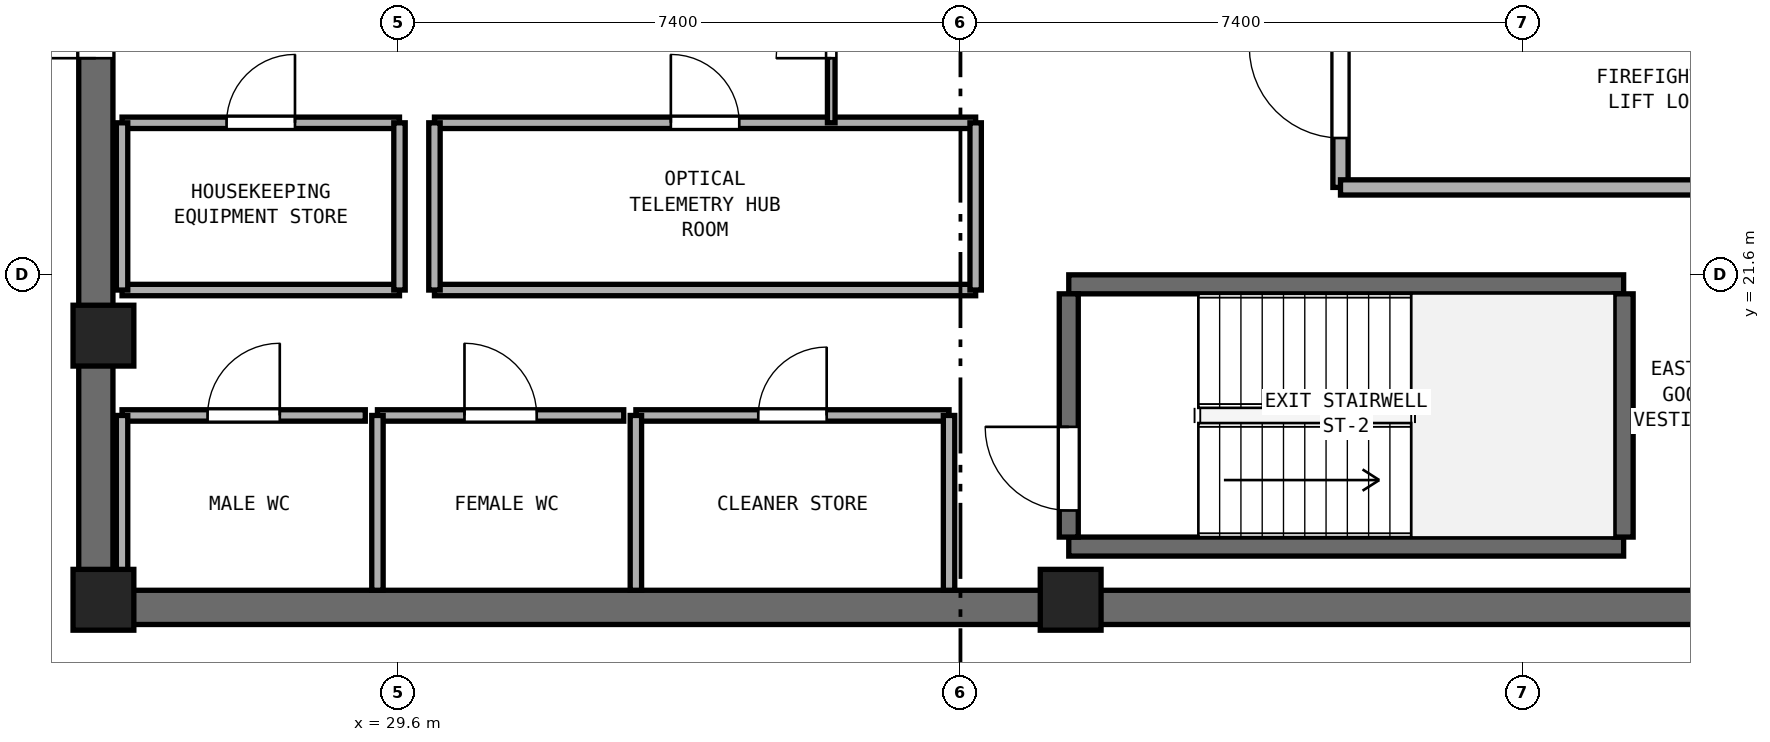
"""IFC4 building model, lengths in metres.
Left out: names, types, materials, properties, quantities, classifications, styles, units other than length and angle.
Written with IfcOpenShell. Run it as: python <this file> out.ifc"""

import sys

from ifc_helpers import new_model, si_unit, direction, frame, frame_2d, origin, origin_2d, place, context, subcontext, project, spatial, rectangle, extrude, element, fill, save


model = new_model("IFC4")
c1 = context("Model", 3, precision=1e-05, world=origin(), true_north=direction((0.0, 1.0)))
c2 = subcontext(c1, "Body", "Model", "MODEL_VIEW")
j1 = project(units=[si_unit("LENGTHUNIT", "METRE"), si_unit("PLANEANGLEUNIT", "RADIAN")], contexts=[c1])
p1 = place(None, origin())
s1 = spatial("IfcSite", under=j1, at=p1, CompositionType="ELEMENT")
p2 = place(p1, origin())
s2 = spatial("IfcBuilding", under=s1, at=p2, CompositionType="ELEMENT")
p3 = place(p2, frame((0.0, 0.0, 255.4)))
s3 = spatial("IfcBuildingStorey", under=s2, at=p3, CompositionType="ELEMENT", Elevation=255.4)
p4 = place(p3, frame((25.4, 17.225, 0.0), z_axis=(0.0, 0.0, 1.0), x_axis=(1.0, 0.0, 0.0)))
e1 = element("IfcWall", 1, at=p4, inside=s3, PredefinedType="SHEAR", context=c2, shape_type="SweptSolid", body=[
    extrude(rectangle(XDim=23.2, YDim=0.45, at=frame_2d((11.6, 0.0))), origin(), (0.0, 0.0, 1.0), 3.51),
])
p5 = place(p3, frame((25.625, 17.45, 0.0), z_axis=(0.0, 0.0, 1.0), x_axis=(0.0, 1.0, 0.0)))
e2 = element("IfcWall", 2, at=p5, inside=s3, PredefinedType="SHEAR", context=c2, shape_type="SweptSolid", body=[
    extrude(rectangle(XDim=15.5, YDim=0.45, at=frame_2d((7.75, 0.0))), origin(), (0.0, 0.0, 1.0), 3.51),
])
p6 = place(p5, frame((7.0, 0.0, 0.0)))
e3 = element("IfcOpeningElement", 3, at=p6, cuts=e2, PredefinedType="OPENING", context=c2, shape_type="SweptSolid", body=[
    extrude(rectangle(XDim=1.5, YDim=2.15, at=frame_2d((0.75, 1.075))), frame((0.0, 0.235, 0.0), z_axis=(0.0, -1.0, 0.0), x_axis=(1.0, 0.0, 0.0)), (0.0, 0.0, 1.0), 0.47),
])
for number, where, z_axis, x_axis in (
    (4, (25.725, 17.325, 0.0), (0.0, 0.0, 1.0), (1.0, 0.0, 0.0)),
    (5, (38.45, 17.325, 0.0), (0.0, 0.0, 1.0), (1.0, 0.0, 0.0)),
    (6, (25.725, 20.8, 0.0), (0.0, 0.0, 1.0), (1.0, 0.0, 0.0)),
):
    element("IfcColumn", number, at=place(p3, frame(where, z_axis=z_axis, x_axis=x_axis)), inside=s3, PredefinedType="PILASTER", context=c2, shape_type="SweptSolid", body=[
        extrude(rectangle(XDim=0.8, YDim=0.8, at=origin_2d()), origin(), (0.0, 0.0, 1.0), 3.8),
    ])
for number, where, z_axis, x_axis in (
    (7, (38.425, 18.025, 0.0), (0.0, 0.0, 1.0), (1.0, 0.0, 0.0)),
    (8, (38.425, 21.475, 0.0), (0.0, 0.0, 1.0), (1.0, 0.0, 0.0)),
):
    element("IfcWall", number, at=place(p3, frame(where, z_axis=z_axis, x_axis=x_axis)), inside=s3, PredefinedType="SHEAR", context=c2, shape_type="SweptSolid", body=[
        extrude(rectangle(XDim=7.3, YDim=0.25, at=frame_2d((3.65, 0.0))), origin(), (0.0, 0.0, 1.0), 3.51),
    ])
p7 = place(p3, frame((38.425, 18.15, 0.0), z_axis=(0.0, 0.0, 1.0), x_axis=(0.0, 1.0, 0.0)))
e9 = element("IfcWall", 9, at=p7, inside=s3, PredefinedType="SHEAR", context=c2, shape_type="SweptSolid", body=[
    extrude(rectangle(XDim=3.2, YDim=0.25, at=frame_2d((1.6, 0.0))), origin(), (0.0, 0.0, 1.0), 3.51),
])
p8 = place(p7, frame((0.35, 0.0, 0.0)))
e10 = element("IfcOpeningElement", 10, at=p8, cuts=e9, PredefinedType="OPENING", context=c2, shape_type="SweptSolid", body=[
    extrude(rectangle(XDim=1.1, YDim=2.15, at=frame_2d((0.55, 1.075))), frame((0.0, 0.135, 0.0), z_axis=(0.0, -1.0, 0.0), x_axis=(1.0, 0.0, 0.0)), (0.0, 0.0, 1.0), 0.27),
])
p9 = place(p3, frame((45.725, 18.15, 0.0), z_axis=(0.0, 0.0, 1.0), x_axis=(0.0, 1.0, 0.0)))
e11 = element("IfcWall", 11, at=p9, inside=s3, PredefinedType="SHEAR", context=c2, shape_type="SweptSolid", body=[
    extrude(rectangle(XDim=3.2, YDim=0.25, at=frame_2d((1.6, 0.0))), origin(), (0.0, 0.0, 1.0), 3.51),
])
p10 = place(p3, frame((42.0, 22.75, 0.0), z_axis=(0.0, 0.0, 1.0), x_axis=(0.0, 1.0, 0.0)))
e12 = element("IfcWall", 12, at=p10, inside=s3, PredefinedType="SOLIDWALL", context=c2, shape_type="SweptSolid", body=[
    extrude(rectangle(XDim=6.05, YDim=0.2, at=frame_2d((3.025, 0.0))), origin(), (0.0, 0.0, 1.0), 3.51),
])
p11 = place(p10, frame((0.65, 0.0, 0.0)))
e13 = element("IfcOpeningElement", 13, at=p11, cuts=e12, PredefinedType="OPENING", context=c2, shape_type="SweptSolid", body=[
    extrude(rectangle(XDim=1.2, YDim=2.15, at=frame_2d((0.6, 1.075))), frame((0.0, 0.11, 0.0), z_axis=(0.0, -1.0, 0.0), x_axis=(1.0, 0.0, 0.0)), (0.0, 0.0, 1.0), 0.22),
])
p12 = place(p3, frame((42.0, 22.75, 0.0), z_axis=(0.0, 0.0, 1.0), x_axis=(1.0, 0.0, 0.0)))
e14 = element("IfcWall", 14, at=p12, inside=s3, PredefinedType="SOLIDWALL", context=c2, shape_type="SweptSolid", body=[
    extrude(rectangle(XDim=6.15, YDim=0.2, at=frame_2d((3.075, 0.0))), origin(), (0.0, 0.0, 1.0), 3.51),
])
p13 = place(p3, frame((25.97, 19.75, 0.0), z_axis=(0.0, 0.0, 1.0), x_axis=(1.0, 0.0, 0.0)))
e15 = element("IfcWall", 15, at=p13, inside=s3, PredefinedType="PARTITIONING", context=c2, shape_type="SweptSolid", body=[
    extrude(rectangle(XDim=3.2, YDim=0.15, at=frame_2d((1.6, 0.0))), origin(), (0.0, 0.0, 1.0), 3.51),
])
p14 = place(p13, frame((1.125, 0.0, 0.0)))
e16 = element("IfcOpeningElement", 16, at=p14, cuts=e15, PredefinedType="OPENING", context=c2, shape_type="SweptSolid", body=[
    extrude(rectangle(XDim=0.95, YDim=2.1, at=frame_2d((0.475, 1.05))), frame((0.0, 0.085, 0.0), z_axis=(0.0, -1.0, 0.0), x_axis=(1.0, 0.0, 0.0)), (0.0, 0.0, 1.0), 0.17),
])
p15 = place(p3, frame((25.97, 17.45, 0.0), z_axis=(0.0, 0.0, 1.0), x_axis=(0.0, 1.0, 0.0)))
e17 = element("IfcWall", 17, at=p15, inside=s3, PredefinedType="PARTITIONING", context=c2, shape_type="SweptSolid", body=[
    extrude(rectangle(XDim=2.3, YDim=0.15, at=frame_2d((1.15, 0.0))), origin(), (0.0, 0.0, 1.0), 2.61),
])
p16 = place(p3, frame((29.33, 19.75, 0.0), z_axis=(0.0, 0.0, 1.0), x_axis=(1.0, 0.0, 0.0)))
e18 = element("IfcWall", 18, at=p16, inside=s3, PredefinedType="PARTITIONING", context=c2, shape_type="SweptSolid", body=[
    extrude(rectangle(XDim=3.24, YDim=0.15, at=frame_2d((1.62, 0.0))), origin(), (0.0, 0.0, 1.0), 3.51),
])
p17 = place(p16, frame((1.145, 0.0, 0.0)))
e19 = element("IfcOpeningElement", 19, at=p17, cuts=e18, PredefinedType="OPENING", context=c2, shape_type="SweptSolid", body=[
    extrude(rectangle(XDim=0.95, YDim=2.1, at=frame_2d((0.475, 1.05))), frame((0.0, 0.085, 0.0), z_axis=(0.0, -1.0, 0.0), x_axis=(1.0, 0.0, 0.0)), (0.0, 0.0, 1.0), 0.17),
])
p18 = place(p3, frame((29.33, 17.45, 0.0), z_axis=(0.0, 0.0, 1.0), x_axis=(0.0, 1.0, 0.0)))
e20 = element("IfcWall", 20, at=p18, inside=s3, PredefinedType="PARTITIONING", context=c2, shape_type="SweptSolid", body=[
    extrude(rectangle(XDim=2.3, YDim=0.15, at=frame_2d((1.15, 0.0))), origin(), (0.0, 0.0, 1.0), 3.51),
])
p19 = place(p3, frame((32.73, 19.75, 0.0), z_axis=(0.0, 0.0, 1.0), x_axis=(1.0, 0.0, 0.0)))
e21 = element("IfcWall", 21, at=p19, inside=s3, PredefinedType="PARTITIONING", context=c2, shape_type="SweptSolid", body=[
    extrude(rectangle(XDim=4.12, YDim=0.15, at=frame_2d((2.06, 0.0))), origin(), (0.0, 0.0, 1.0), 3.51),
])
p20 = place(p19, frame((1.61, 0.0, 0.0)))
e22 = element("IfcOpeningElement", 22, at=p20, cuts=e21, PredefinedType="OPENING", context=c2, shape_type="SweptSolid", body=[
    extrude(rectangle(XDim=0.9, YDim=2.1, at=frame_2d((0.45, 1.05))), frame((0.0, 0.085, 0.0), z_axis=(0.0, -1.0, 0.0), x_axis=(1.0, 0.0, 0.0)), (0.0, 0.0, 1.0), 0.17),
])
for number, where, z_axis, x_axis in (
    (23, (32.73, 17.45, 0.0), (0.0, 0.0, 1.0), (0.0, 1.0, 0.0)),
    (24, (36.85, 17.45, 0.0), (0.0, 0.0, 1.0), (0.0, 1.0, 0.0)),
):
    element("IfcWall", number, at=place(p3, frame(where, z_axis=z_axis, x_axis=x_axis)), inside=s3, PredefinedType="PARTITIONING", context=c2, shape_type="SweptSolid", body=[
        extrude(rectangle(XDim=2.3, YDim=0.15, at=frame_2d((1.15, 0.0))), origin(), (0.0, 0.0, 1.0), 3.51),
    ])
p21 = place(p3, frame((25.97, 21.4, 0.0), z_axis=(0.0, 0.0, 1.0), x_axis=(1.0, 0.0, 0.0)))
e25 = element("IfcWall", 25, at=p21, inside=s3, PredefinedType="PARTITIONING", context=c2, shape_type="SweptSolid", body=[
    extrude(rectangle(XDim=3.65, YDim=0.15, at=frame_2d((1.825, 0.0))), origin(), (0.0, 0.0, 1.0), 3.51),
])
p22 = place(p3, frame((25.97, 23.6, 0.0), z_axis=(0.0, 0.0, 1.0), x_axis=(1.0, 0.0, 0.0)))
e26 = element("IfcWall", 26, at=p22, inside=s3, PredefinedType="PARTITIONING", context=c2, shape_type="SweptSolid", body=[
    extrude(rectangle(XDim=3.65, YDim=0.15, at=frame_2d((1.825, 0.0))), origin(), (0.0, 0.0, 1.0), 3.51),
])
p23 = place(p22, frame((1.375, 0.0, 0.0)))
e27 = element("IfcOpeningElement", 27, at=p23, cuts=e26, PredefinedType="OPENING", context=c2, shape_type="SweptSolid", body=[
    extrude(rectangle(XDim=0.9, YDim=2.1, at=frame_2d((0.45, 1.05))), frame((0.0, 0.085, 0.0), z_axis=(0.0, -1.0, 0.0), x_axis=(1.0, 0.0, 0.0)), (0.0, 0.0, 1.0), 0.17),
])
p24 = place(p3, frame((25.97, 21.4, 0.0), z_axis=(0.0, 0.0, 1.0), x_axis=(0.0, 1.0, 0.0)))
e28 = element("IfcWall", 28, at=p24, inside=s3, PredefinedType="PARTITIONING", context=c2, shape_type="SweptSolid", body=[
    extrude(rectangle(XDim=2.2, YDim=0.15, at=frame_2d((1.1, 0.0))), origin(), (0.0, 0.0, 1.0), 2.61),
])
p25 = place(p3, frame((29.62, 21.4, 0.0), z_axis=(0.0, 0.0, 1.0), x_axis=(0.0, 1.0, 0.0)))
e29 = element("IfcWall", 29, at=p25, inside=s3, PredefinedType="PARTITIONING", context=c2, shape_type="SweptSolid", body=[
    extrude(rectangle(XDim=2.2, YDim=0.15, at=frame_2d((1.1, 0.0))), origin(), (0.0, 0.0, 1.0), 3.51),
])
p26 = place(p3, frame((30.08, 21.4, 0.0), z_axis=(0.0, 0.0, 1.0), x_axis=(1.0, 0.0, 0.0)))
e30 = element("IfcWall", 30, at=p26, inside=s3, PredefinedType="PARTITIONING", context=c2, shape_type="SweptSolid", body=[
    extrude(rectangle(XDim=7.12, YDim=0.15, at=frame_2d((3.56, 0.0))), origin(), (0.0, 0.0, 1.0), 3.51),
])
p27 = place(p3, frame((30.08, 23.6, 0.0), z_axis=(0.0, 0.0, 1.0), x_axis=(1.0, 0.0, 0.0)))
e31 = element("IfcWall", 31, at=p27, inside=s3, PredefinedType="PARTITIONING", context=c2, shape_type="SweptSolid", body=[
    extrude(rectangle(XDim=7.12, YDim=0.15, at=frame_2d((3.56, 0.0))), origin(), (0.0, 0.0, 1.0), 3.51),
])
p28 = place(p27, frame((3.11, 0.0, 0.0)))
e32 = element("IfcOpeningElement", 32, at=p28, cuts=e31, PredefinedType="OPENING", context=c2, shape_type="SweptSolid", body=[
    extrude(rectangle(XDim=0.9, YDim=2.1, at=frame_2d((0.45, 1.05))), frame((0.0, 0.085, 0.0), z_axis=(0.0, -1.0, 0.0), x_axis=(1.0, 0.0, 0.0)), (0.0, 0.0, 1.0), 0.17),
])
for number, where, z_axis, x_axis in (
    (33, (30.08, 21.4, 0.0), (0.0, 0.0, 1.0), (0.0, 1.0, 0.0)),
    (34, (37.2, 21.4, 0.0), (0.0, 0.0, 1.0), (0.0, 1.0, 0.0)),
):
    element("IfcWall", number, at=place(p3, frame(where, z_axis=z_axis, x_axis=x_axis)), inside=s3, PredefinedType="PARTITIONING", context=c2, shape_type="SweptSolid", body=[
        extrude(rectangle(XDim=2.2, YDim=0.15, at=frame_2d((1.1, 0.0))), origin(), (0.0, 0.0, 1.0), 3.51),
    ])
p29 = place(p3, frame((35.3, 23.6, 0.0), z_axis=(0.0, 0.0, 1.0), x_axis=(0.0, 1.0, 0.0)))
e35 = element("IfcWall", 35, at=p29, inside=s3, PredefinedType="PARTITIONING", context=c2, shape_type="SweptSolid", body=[
    extrude(rectangle(XDim=3.2, YDim=0.1, at=frame_2d((1.6, 0.0))), origin(), (0.0, 0.0, 1.0), 3.51),
])
p30 = place(p29, frame((0.85, 0.0, 0.0)))
e36 = element("IfcOpeningElement", 36, at=p30, cuts=e35, PredefinedType="OPENING", context=c2, shape_type="SweptSolid", body=[
    extrude(rectangle(XDim=1.45, YDim=2.12, at=frame_2d((0.725, 1.06))), frame((0.0, 0.06, 0.0), z_axis=(0.0, -1.0, 0.0), x_axis=(1.0, 0.0, 0.0)), (0.0, 0.0, 1.0), 0.12),
])
p31 = place(p8, origin())
e37 = element("IfcDoor", 37, at=p31, inside=s3, OperationType="SINGLE_SWING_RIGHT", PredefinedType="DOOR", context=c2, shape_type="SweptSolid", body=[
    extrude(rectangle(XDim=1.1, YDim=2.15, at=frame_2d((0.55, 1.075))), frame((0.0, 0.025, 0.0), z_axis=(0.0, -1.0, 0.0), x_axis=(1.0, 0.0, 0.0)), (0.0, 0.0, 1.0), 0.05),
])
fill(e10, e37)
p32 = place(p11, origin())
e38 = element("IfcDoor", 38, at=p32, inside=s3, OperationType="SINGLE_SWING_RIGHT", PredefinedType="DOOR", context=c2, shape_type="SweptSolid", body=[
    extrude(rectangle(XDim=1.2, YDim=2.15, at=frame_2d((0.6, 1.075))), frame((0.0, 0.025, 0.0), z_axis=(0.0, -1.0, 0.0), x_axis=(1.0, 0.0, 0.0)), (0.0, 0.0, 1.0), 0.05),
])
fill(e13, e38)
p33 = place(p6, origin())
e39 = element("IfcDoor", 39, at=p33, inside=s3, OperationType="DOUBLE_DOOR_SINGLE_SWING", PredefinedType="DOOR", context=c2, shape_type="SweptSolid", body=[
    extrude(rectangle(XDim=1.5, YDim=2.15, at=frame_2d((0.75, 1.075))), frame((0.0, 0.025, 0.0), z_axis=(0.0, -1.0, 0.0), x_axis=(1.0, 0.0, 0.0)), (0.0, 0.0, 1.0), 0.05),
])
fill(e3, e39)
p34 = place(p14, origin())
e40 = element("IfcDoor", 40, at=p34, inside=s3, OperationType="SINGLE_SWING_RIGHT", PredefinedType="DOOR", context=c2, shape_type="SweptSolid", body=[
    extrude(rectangle(XDim=0.95, YDim=2.1, at=frame_2d((0.475, 1.05))), frame((0.0, 0.025, 0.0), z_axis=(0.0, -1.0, 0.0), x_axis=(1.0, 0.0, 0.0)), (0.0, 0.0, 1.0), 0.05),
])
fill(e16, e40)
p35 = place(p17, origin())
e41 = element("IfcDoor", 41, at=p35, inside=s3, OperationType="SINGLE_SWING_LEFT", PredefinedType="DOOR", context=c2, shape_type="SweptSolid", body=[
    extrude(rectangle(XDim=0.95, YDim=2.1, at=frame_2d((0.475, 1.05))), frame((0.0, 0.025, 0.0), z_axis=(0.0, -1.0, 0.0), x_axis=(1.0, 0.0, 0.0)), (0.0, 0.0, 1.0), 0.05),
])
fill(e19, e41)
p36 = place(p20, origin())
e42 = element("IfcDoor", 42, at=p36, inside=s3, OperationType="SINGLE_SWING_RIGHT", PredefinedType="DOOR", context=c2, shape_type="SweptSolid", body=[
    extrude(rectangle(XDim=0.9, YDim=2.1, at=frame_2d((0.45, 1.05))), frame((0.0, 0.025, 0.0), z_axis=(0.0, -1.0, 0.0), x_axis=(1.0, 0.0, 0.0)), (0.0, 0.0, 1.0), 0.05),
])
fill(e22, e42)
p37 = place(p23, origin())
e43 = element("IfcDoor", 43, at=p37, inside=s3, OperationType="SINGLE_SWING_RIGHT", PredefinedType="DOOR", context=c2, shape_type="SweptSolid", body=[
    extrude(rectangle(XDim=0.9, YDim=2.1, at=frame_2d((0.45, 1.05))), frame((0.0, 0.025, 0.0), z_axis=(0.0, -1.0, 0.0), x_axis=(1.0, 0.0, 0.0)), (0.0, 0.0, 1.0), 0.05),
])
fill(e27, e43)
p38 = place(p28, origin())
e44 = element("IfcDoor", 44, at=p38, inside=s3, OperationType="SINGLE_SWING_LEFT", PredefinedType="DOOR", context=c2, shape_type="SweptSolid", body=[
    extrude(rectangle(XDim=0.9, YDim=2.1, at=frame_2d((0.45, 1.05))), frame((0.0, 0.025, 0.0), z_axis=(0.0, -1.0, 0.0), x_axis=(1.0, 0.0, 0.0)), (0.0, 0.0, 1.0), 0.05),
])
fill(e32, e44)
p39 = place(p30, origin())
e45 = element("IfcDoor", 45, at=p39, inside=s3, OperationType="DOUBLE_DOOR_SINGLE_SWING", PredefinedType="DOOR", context=c2, shape_type="SweptSolid", body=[
    extrude(rectangle(XDim=1.45, YDim=2.12, at=frame_2d((0.725, 1.06))), frame((0.0, 0.025, 0.0), z_axis=(0.0, -1.0, 0.0), x_axis=(1.0, 0.0, 0.0)), (0.0, 0.0, 1.0), 0.05),
])
fill(e36, e45)
save(model, sys.argv[1])
